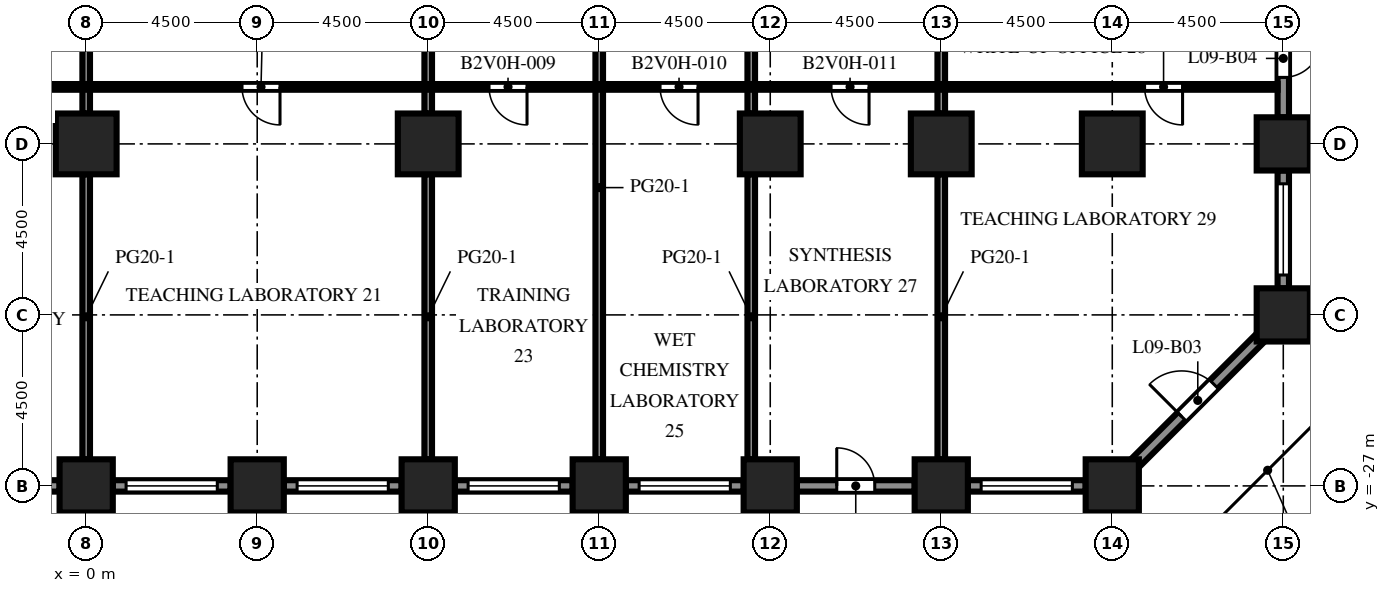
"""IFC4 building model, lengths in metres.
Left out: names, types, materials, properties, quantities, classifications, styles, units other than length and angle.
Written with IfcOpenShell. Run it as: python <this file> out.ifc"""

import sys

from ifc_helpers import new_model, si_unit, direction, frame, frame_2d, origin, origin_2d, place, context, subcontext, project, spatial, rectangle, extrude, element, fill, save


model = new_model("IFC4")
c1 = context("Model", 3, precision=1e-05, world=origin(), true_north=direction((0.0, 1.0)))
c2 = subcontext(c1, "Body", "Model", "MODEL_VIEW")
j1 = project(units=[si_unit("LENGTHUNIT", "METRE"), si_unit("PLANEANGLEUNIT", "RADIAN")], contexts=[c1])
p1 = place(None, origin())
s1 = spatial("IfcSite", under=j1, at=p1, CompositionType="ELEMENT")
p2 = place(p1, origin())
s2 = spatial("IfcBuilding", under=s1, at=p2, CompositionType="ELEMENT")
p3 = place(p2, frame((0.0, 0.0, 41.9)))
s3 = spatial("IfcBuildingStorey", under=s2, at=p3, CompositionType="ELEMENT", Elevation=41.9)
for number, where, z_axis, x_axis in (
    (1, (0.0, -27.0, 0.0), (0.0, 0.0, 1.0), (1.0, 0.0, 0.0)),
    (2, (4.5, -27.0, 0.0), (0.0, 0.0, 1.0), (1.0, 0.0, 0.0)),
    (3, (9.0, -27.0, 0.0), (0.0, 0.0, 1.0), (1.0, 0.0, 0.0)),
    (4, (13.5, -27.0, 0.0), (0.0, 0.0, 1.0), (1.0, 0.0, 0.0)),
    (5, (18.0, -27.0, 0.0), (0.0, 0.0, 1.0), (1.0, 0.0, 0.0)),
    (6, (22.5, -27.0, 0.0), (0.0, 0.0, 1.0), (1.0, 0.0, 0.0)),
    (7, (27.0, -27.0, 0.0), (0.0, 0.0, 1.0), (1.0, 0.0, 0.0)),
):
    element("IfcColumn", number, at=place(p3, frame(where, z_axis=z_axis, x_axis=x_axis)), inside=s3, PredefinedType="COLUMN", context=c2, shape_type="SweptSolid", body=[
        extrude(rectangle(XDim=1.4, YDim=1.4, at=origin_2d()), origin(), (0.0, 0.0, 1.0), 4.1),
    ])
for number, where, z_axis, x_axis in (
    (8, (31.5, -22.5, -0.45), (0.0, 0.0, 1.0), (1.0, 0.0, 0.0)),
    (9, (31.5, -18.0, -0.45), (0.0, 0.0, 1.0), (1.0, 0.0, 0.0)),
):
    element("IfcColumn", number, at=place(p3, frame(where, z_axis=z_axis, x_axis=x_axis)), inside=s3, PredefinedType="COLUMN", context=c2, shape_type="SweptSolid", body=[
        extrude(rectangle(XDim=1.4, YDim=1.4, at=origin_2d()), origin(), (0.0, 0.0, 1.0), 4.55),
    ])
for number, where, z_axis, x_axis in (
    (10, (0.0, -18.0, 0.0), (0.0, 0.0, 1.0), (1.0, 0.0, 0.0)),
    (11, (9.0, -18.0, 0.0), (0.0, 0.0, 1.0), (1.0, 0.0, 0.0)),
):
    element("IfcColumn", number, at=place(p3, frame(where, z_axis=z_axis, x_axis=x_axis)), inside=s3, PredefinedType="COLUMN", context=c2, shape_type="SweptSolid", body=[
        extrude(rectangle(XDim=1.6, YDim=1.6, at=origin_2d()), origin(), (0.0, 0.0, 1.0), 4.1),
    ])
for number, where, z_axis, x_axis in (
    (12, (18.0, -18.0, -0.45), (0.0, 0.0, 1.0), (1.0, 0.0, 0.0)),
    (13, (22.5, -18.0, -0.45), (0.0, 0.0, 1.0), (1.0, 0.0, 0.0)),
    (14, (27.0, -18.0, -0.45), (0.0, 0.0, 1.0), (1.0, 0.0, 0.0)),
):
    element("IfcColumn", number, at=place(p3, frame(where, z_axis=z_axis, x_axis=x_axis)), inside=s3, PredefinedType="COLUMN", context=c2, shape_type="SweptSolid", body=[
        extrude(rectangle(XDim=1.6, YDim=1.6, at=origin_2d()), origin(), (0.0, 0.0, 1.0), 4.55),
    ])
p4 = place(p3, frame((-0.7, -27.0, 0.0), z_axis=(0.0, 0.0, 1.0), x_axis=(-1.0, 0.0, 0.0)))
e15 = element("IfcWall", 15, at=p4, inside=s3, PredefinedType="SOLIDWALL", context=c2, shape_type="SweptSolid", body=[
    extrude(rectangle(XDim=3.1, YDim=0.3, at=frame_2d((1.55, 0.0))), origin(), (0.0, 0.0, 1.0), 2.75),
])
p5 = place(p4, frame((0.35, 0.0, 0.8)))
e16 = element("IfcOpeningElement", 16, at=p5, cuts=e15, PredefinedType="OPENING", context=c2, shape_type="SweptSolid", body=[
    extrude(rectangle(XDim=2.4, YDim=1.7, at=frame_2d((1.2, 0.85))), frame((0.0, 0.16, 0.0), z_axis=(0.0, -1.0, 0.0), x_axis=(1.0, 0.0, 0.0)), (0.0, 0.0, 1.0), 0.32),
])
p6 = place(p3, frame((3.8, -27.0, 0.0), z_axis=(0.0, 0.0, 1.0), x_axis=(-1.0, 0.0, 0.0)))
e17 = element("IfcWall", 17, at=p6, inside=s3, PredefinedType="SOLIDWALL", context=c2, shape_type="SweptSolid", body=[
    extrude(rectangle(XDim=3.1, YDim=0.3, at=frame_2d((1.55, 0.0))), origin(), (0.0, 0.0, 1.0), 2.75),
])
p7 = place(p6, frame((0.35, 0.0, 0.8)))
e18 = element("IfcOpeningElement", 18, at=p7, cuts=e17, PredefinedType="OPENING", context=c2, shape_type="SweptSolid", body=[
    extrude(rectangle(XDim=2.4, YDim=1.7, at=frame_2d((1.2, 0.85))), frame((0.0, 0.16, 0.0), z_axis=(0.0, -1.0, 0.0), x_axis=(1.0, 0.0, 0.0)), (0.0, 0.0, 1.0), 0.32),
])
p8 = place(p3, frame((8.3, -27.0, 0.0), z_axis=(0.0, 0.0, 1.0), x_axis=(-1.0, 0.0, 0.0)))
e19 = element("IfcWall", 19, at=p8, inside=s3, PredefinedType="SOLIDWALL", context=c2, shape_type="SweptSolid", body=[
    extrude(rectangle(XDim=3.1, YDim=0.3, at=frame_2d((1.55, 0.0))), origin(), (0.0, 0.0, 1.0), 2.75),
])
p9 = place(p8, frame((0.35, 0.0, 0.8)))
e20 = element("IfcOpeningElement", 20, at=p9, cuts=e19, PredefinedType="OPENING", context=c2, shape_type="SweptSolid", body=[
    extrude(rectangle(XDim=2.4, YDim=1.7, at=frame_2d((1.2, 0.85))), frame((0.0, 0.16, 0.0), z_axis=(0.0, -1.0, 0.0), x_axis=(1.0, 0.0, 0.0)), (0.0, 0.0, 1.0), 0.32),
])
p10 = place(p3, frame((12.8, -27.0, 0.0), z_axis=(0.0, 0.0, 1.0), x_axis=(-1.0, 0.0, 0.0)))
e21 = element("IfcWall", 21, at=p10, inside=s3, PredefinedType="SOLIDWALL", context=c2, shape_type="SweptSolid", body=[
    extrude(rectangle(XDim=3.1, YDim=0.3, at=frame_2d((1.55, 0.0))), origin(), (0.0, 0.0, 1.0), 2.75),
])
p11 = place(p10, frame((0.35, 0.0, 0.8)))
e22 = element("IfcOpeningElement", 22, at=p11, cuts=e21, PredefinedType="OPENING", context=c2, shape_type="SweptSolid", body=[
    extrude(rectangle(XDim=2.4, YDim=1.7, at=frame_2d((1.2, 0.85))), frame((0.0, 0.16, 0.0), z_axis=(0.0, -1.0, 0.0), x_axis=(1.0, 0.0, 0.0)), (0.0, 0.0, 1.0), 0.32),
])
p12 = place(p3, frame((17.3, -27.0, 0.0), z_axis=(0.0, 0.0, 1.0), x_axis=(-1.0, 0.0, 0.0)))
e23 = element("IfcWall", 23, at=p12, inside=s3, PredefinedType="SOLIDWALL", context=c2, shape_type="SweptSolid", body=[
    extrude(rectangle(XDim=3.1, YDim=0.3, at=frame_2d((1.55, 0.0))), origin(), (0.0, 0.0, 1.0), 2.75),
])
p13 = place(p12, frame((0.35, 0.0, 0.8)))
e24 = element("IfcOpeningElement", 24, at=p13, cuts=e23, PredefinedType="OPENING", context=c2, shape_type="SweptSolid", body=[
    extrude(rectangle(XDim=2.4, YDim=1.7, at=frame_2d((1.2, 0.85))), frame((0.0, 0.16, 0.0), z_axis=(0.0, -1.0, 0.0), x_axis=(1.0, 0.0, 0.0)), (0.0, 0.0, 1.0), 0.32),
])
p14 = place(p3, frame((21.8, -27.0, 0.0), z_axis=(0.0, 0.0, 1.0), x_axis=(-1.0, 0.0, 0.0)))
e25 = element("IfcWall", 25, at=p14, inside=s3, PredefinedType="SOLIDWALL", context=c2, shape_type="SweptSolid", body=[
    extrude(rectangle(XDim=3.1, YDim=0.3, at=frame_2d((1.55, 0.0))), origin(), (0.0, 0.0, 1.0), 2.75),
])
p15 = place(p14, frame((1.05, 0.0, 0.0)))
e26 = element("IfcOpeningElement", 26, at=p15, cuts=e25, PredefinedType="OPENING", context=c2, shape_type="SweptSolid", body=[
    extrude(rectangle(XDim=1.0, YDim=2.2, at=frame_2d((0.5, 1.1))), frame((0.0, 0.16, 0.0), z_axis=(0.0, -1.0, 0.0), x_axis=(1.0, 0.0, 0.0)), (0.0, 0.0, 1.0), 0.32),
])
p16 = place(p3, frame((26.3, -27.0, 0.0), z_axis=(0.0, 0.0, 1.0), x_axis=(-1.0, 0.0, 0.0)))
e27 = element("IfcWall", 27, at=p16, inside=s3, PredefinedType="SOLIDWALL", context=c2, shape_type="SweptSolid", body=[
    extrude(rectangle(XDim=3.1, YDim=0.3, at=frame_2d((1.55, 0.0))), origin(), (0.0, 0.0, 1.0), 2.75),
])
p17 = place(p16, frame((0.35, 0.0, 0.8)))
e28 = element("IfcOpeningElement", 28, at=p17, cuts=e27, PredefinedType="OPENING", context=c2, shape_type="SweptSolid", body=[
    extrude(rectangle(XDim=2.4, YDim=1.7, at=frame_2d((1.2, 0.85))), frame((0.0, 0.16, 0.0), z_axis=(0.0, -1.0, 0.0), x_axis=(1.0, 0.0, 0.0)), (0.0, 0.0, 1.0), 0.32),
])
p18 = place(p3, frame((30.906, -23.094, 0.0), z_axis=(0.0, 0.0, 1.0), x_axis=(-0.707106781187, -0.707106781187, 0.0)))
e29 = element("IfcWall", 29, at=p18, inside=s3, PredefinedType="SOLIDWALL", context=c2, shape_type="SweptSolid", body=[
    extrude(rectangle(XDim=4.684, YDim=0.3, at=frame_2d((2.342, 0.0))), origin(), (0.0, 0.0, 1.0), 2.75),
])
p19 = place(p18, frame((1.742, 0.0, 0.0)))
e30 = element("IfcOpeningElement", 30, at=p19, cuts=e29, PredefinedType="OPENING", context=c2, shape_type="SweptSolid", body=[
    extrude(rectangle(XDim=1.2, YDim=2.2, at=frame_2d((0.6, 1.1))), frame((0.0, 0.16, 0.0), z_axis=(0.0, -1.0, 0.0), x_axis=(1.0, 0.0, 0.0)), (0.0, 0.0, 1.0), 0.32),
])
p20 = place(p3, frame((31.5, -18.7, 0.0), z_axis=(0.0, 0.0, 1.0), x_axis=(0.0, -1.0, 0.0)))
e31 = element("IfcWall", 31, at=p20, inside=s3, PredefinedType="SOLIDWALL", context=c2, shape_type="SweptSolid", body=[
    extrude(rectangle(XDim=3.1, YDim=0.3, at=frame_2d((1.55, 0.0))), origin(), (0.0, 0.0, 1.0), 2.75),
])
p21 = place(p20, frame((0.35, 0.0, 0.8)))
e32 = element("IfcOpeningElement", 32, at=p21, cuts=e31, PredefinedType="OPENING", context=c2, shape_type="SweptSolid", body=[
    extrude(rectangle(XDim=2.4, YDim=1.7, at=frame_2d((1.2, 0.85))), frame((0.0, 0.16, 0.0), z_axis=(0.0, -1.0, 0.0), x_axis=(1.0, 0.0, 0.0)), (0.0, 0.0, 1.0), 0.32),
])
p22 = place(p3, frame((31.5, -14.2, 0.0), z_axis=(0.0, 0.0, 1.0), x_axis=(0.0, -1.0, 0.0)))
e33 = element("IfcWall", 33, at=p22, inside=s3, PredefinedType="SOLIDWALL", context=c2, shape_type="SweptSolid", body=[
    extrude(rectangle(XDim=3.1, YDim=0.3, at=frame_2d((1.55, 0.0))), origin(), (0.0, 0.0, 1.0), 2.75),
])
p23 = place(p22, frame((1.05, 0.0, 0.0)))
e34 = element("IfcOpeningElement", 34, at=p23, cuts=e33, PredefinedType="OPENING", context=c2, shape_type="SweptSolid", body=[
    extrude(rectangle(XDim=1.0, YDim=2.2, at=frame_2d((0.5, 1.1))), frame((0.0, 0.16, 0.0), z_axis=(0.0, -1.0, 0.0), x_axis=(1.0, 0.0, 0.0)), (0.0, 0.0, 1.0), 0.32),
])
p24 = place(p3, frame((0.0, -26.3, 0.0), z_axis=(0.0, 0.0, 1.0), x_axis=(0.0, 1.0, 0.0)))
e35 = element("IfcWall", 35, at=p24, inside=s3, PredefinedType="PARTITIONING", context=c2, shape_type="SweptSolid", body=[
    extrude(rectangle(XDim=7.5, YDim=0.2, at=frame_2d((3.75, 0.0))), origin(), (0.0, 0.0, 1.0), 3.65),
])
p25 = place(p3, frame((0.0, -17.2, 0.0), z_axis=(0.0, 0.0, 1.0), x_axis=(0.0, 1.0, 0.0)))
e36 = element("IfcWall", 36, at=p25, inside=s3, PredefinedType="PARTITIONING", context=c2, shape_type="SweptSolid", body=[
    extrude(rectangle(XDim=5.2, YDim=0.2, at=frame_2d((2.6, 0.0))), origin(), (0.0, 0.0, 1.0), 3.65),
])
p26 = place(p3, frame((9.0, -26.3, 0.0), z_axis=(0.0, 0.0, 1.0), x_axis=(0.0, 1.0, 0.0)))
e37 = element("IfcWall", 37, at=p26, inside=s3, PredefinedType="PARTITIONING", context=c2, shape_type="SweptSolid", body=[
    extrude(rectangle(XDim=7.5, YDim=0.2, at=frame_2d((3.75, 0.0))), origin(), (0.0, 0.0, 1.0), 3.65),
])
p27 = place(p3, frame((9.0, -17.2, 0.0), z_axis=(0.0, 0.0, 1.0), x_axis=(0.0, 1.0, 0.0)))
e38 = element("IfcWall", 38, at=p27, inside=s3, PredefinedType="PARTITIONING", context=c2, shape_type="SweptSolid", body=[
    extrude(rectangle(XDim=5.2, YDim=0.2, at=frame_2d((2.6, 0.0))), origin(), (0.0, 0.0, 1.0), 3.65),
])
p28 = place(p3, frame((13.5, -26.3, 0.0), z_axis=(0.0, 0.0, 1.0), x_axis=(0.0, 1.0, 0.0)))
e39 = element("IfcWall", 39, at=p28, inside=s3, PredefinedType="PARTITIONING", context=c2, shape_type="SweptSolid", body=[
    extrude(rectangle(XDim=14.3, YDim=0.2, at=frame_2d((7.15, 0.0))), origin(), (0.0, 0.0, 1.0), 3.65),
])
p29 = place(p3, frame((17.5, -26.3, 0.0), z_axis=(0.0, 0.0, 1.0), x_axis=(0.0, 1.0, 0.0)))
e40 = element("IfcWall", 40, at=p29, inside=s3, PredefinedType="PARTITIONING", context=c2, shape_type="SweptSolid", body=[
    extrude(rectangle(XDim=7.5, YDim=0.2, at=frame_2d((3.75, 0.0))), origin(), (0.0, 0.0, 1.0), 3.65),
])
p30 = place(p3, frame((17.5, -17.2, 0.0), z_axis=(0.0, 0.0, 1.0), x_axis=(0.0, 1.0, 0.0)))
e41 = element("IfcWall", 41, at=p30, inside=s3, PredefinedType="PARTITIONING", context=c2, shape_type="SweptSolid", body=[
    extrude(rectangle(XDim=5.2, YDim=0.2, at=frame_2d((2.6, 0.0))), origin(), (0.0, 0.0, 1.0), 3.65),
])
p31 = place(p3, frame((22.5, -26.3, 0.0), z_axis=(0.0, 0.0, 1.0), x_axis=(0.0, 1.0, 0.0)))
e42 = element("IfcWall", 42, at=p31, inside=s3, PredefinedType="PARTITIONING", context=c2, shape_type="SweptSolid", body=[
    extrude(rectangle(XDim=7.5, YDim=0.2, at=frame_2d((3.75, 0.0))), origin(), (0.0, 0.0, 1.0), 3.65),
])
p32 = place(p3, frame((22.5, -17.2, 0.0), z_axis=(0.0, 0.0, 1.0), x_axis=(0.0, 1.0, 0.0)))
e43 = element("IfcWall", 43, at=p32, inside=s3, PredefinedType="PARTITIONING", context=c2, shape_type="SweptSolid", body=[
    extrude(rectangle(XDim=5.2, YDim=0.2, at=frame_2d((2.6, 0.0))), origin(), (0.0, 0.0, 1.0), 3.65),
])
p33 = place(p3, frame((31.35, -16.5, 0.0), z_axis=(0.0, 0.0, 1.0), x_axis=(-1.0, 0.0, 0.0)))
e44 = element("IfcWall", 44, at=p33, inside=s3, PredefinedType="PARTITIONING", context=c2, shape_type="SweptSolid", body=[
    extrude(rectangle(XDim=53.7, YDim=0.15, at=frame_2d((26.85, 0.0))), origin(), (0.0, 0.0, 1.0), 3.65),
])
p34 = place(p33, frame((50.75, 0.0, 0.0)))
e45 = element("IfcOpeningElement", 45, at=p34, cuts=e44, PredefinedType="OPENING", context=c2, shape_type="SweptSolid", body=[
    extrude(rectangle(XDim=1.0, YDim=2.1, at=frame_2d((0.5, 1.05))), frame((0.0, 0.085, 0.0), z_axis=(0.0, -1.0, 0.0), x_axis=(1.0, 0.0, 0.0)), (0.0, 0.0, 1.0), 0.17),
])
p35 = place(p33, frame((43.75, 0.0, 0.0)))
e46 = element("IfcOpeningElement", 46, at=p35, cuts=e44, PredefinedType="OPENING", context=c2, shape_type="SweptSolid", body=[
    extrude(rectangle(XDim=1.0, YDim=2.1, at=frame_2d((0.5, 1.05))), frame((0.0, 0.085, 0.0), z_axis=(0.0, -1.0, 0.0), x_axis=(1.0, 0.0, 0.0)), (0.0, 0.0, 1.0), 0.17),
])
p36 = place(p33, frame((33.0, 0.0, 0.0)))
e47 = element("IfcOpeningElement", 47, at=p36, cuts=e44, PredefinedType="OPENING", context=c2, shape_type="SweptSolid", body=[
    extrude(rectangle(XDim=1.0, YDim=2.1, at=frame_2d((0.5, 1.05))), frame((0.0, 0.085, 0.0), z_axis=(0.0, -1.0, 0.0), x_axis=(1.0, 0.0, 0.0)), (0.0, 0.0, 1.0), 0.17),
])
p37 = place(p33, frame((26.25, 0.0, 0.0)))
e48 = element("IfcOpeningElement", 48, at=p37, cuts=e44, PredefinedType="OPENING", context=c2, shape_type="SweptSolid", body=[
    extrude(rectangle(XDim=1.0, YDim=2.1, at=frame_2d((0.5, 1.05))), frame((0.0, 0.085, 0.0), z_axis=(0.0, -1.0, 0.0), x_axis=(1.0, 0.0, 0.0)), (0.0, 0.0, 1.0), 0.17),
])
p38 = place(p33, frame((19.75, 0.0, 0.0)))
e49 = element("IfcOpeningElement", 49, at=p38, cuts=e44, PredefinedType="OPENING", context=c2, shape_type="SweptSolid", body=[
    extrude(rectangle(XDim=1.0, YDim=2.1, at=frame_2d((0.5, 1.05))), frame((0.0, 0.085, 0.0), z_axis=(0.0, -1.0, 0.0), x_axis=(1.0, 0.0, 0.0)), (0.0, 0.0, 1.0), 0.17),
])
p39 = place(p33, frame((15.25, 0.0, 0.0)))
e50 = element("IfcOpeningElement", 50, at=p39, cuts=e44, PredefinedType="OPENING", context=c2, shape_type="SweptSolid", body=[
    extrude(rectangle(XDim=1.0, YDim=2.1, at=frame_2d((0.5, 1.05))), frame((0.0, 0.085, 0.0), z_axis=(0.0, -1.0, 0.0), x_axis=(1.0, 0.0, 0.0)), (0.0, 0.0, 1.0), 0.17),
])
p40 = place(p33, frame((10.75, 0.0, 0.0)))
e51 = element("IfcOpeningElement", 51, at=p40, cuts=e44, PredefinedType="OPENING", context=c2, shape_type="SweptSolid", body=[
    extrude(rectangle(XDim=1.0, YDim=2.1, at=frame_2d((0.5, 1.05))), frame((0.0, 0.085, 0.0), z_axis=(0.0, -1.0, 0.0), x_axis=(1.0, 0.0, 0.0)), (0.0, 0.0, 1.0), 0.17),
])
p41 = place(p33, frame((2.5, 0.0, 0.0)))
e52 = element("IfcOpeningElement", 52, at=p41, cuts=e44, PredefinedType="OPENING", context=c2, shape_type="SweptSolid", body=[
    extrude(rectangle(XDim=1.0, YDim=2.1, at=frame_2d((0.5, 1.05))), frame((0.0, 0.085, 0.0), z_axis=(0.0, -1.0, 0.0), x_axis=(1.0, 0.0, 0.0)), (0.0, 0.0, 1.0), 0.17),
])
p42 = place(p7, origin())
e53 = element("IfcWindow", 53, at=p42, inside=s3, PartitioningType="SINGLE_PANEL", PredefinedType="WINDOW", context=c2, shape_type="SweptSolid", body=[
    extrude(rectangle(XDim=2.4, YDim=1.7, at=frame_2d((1.2, 0.85))), frame((0.0, 0.03, 0.0), z_axis=(0.0, -1.0, 0.0), x_axis=(1.0, 0.0, 0.0)), (0.0, 0.0, 1.0), 0.06),
])
fill(e18, e53)
p43 = place(p9, origin())
e54 = element("IfcWindow", 54, at=p43, inside=s3, PartitioningType="SINGLE_PANEL", PredefinedType="WINDOW", context=c2, shape_type="SweptSolid", body=[
    extrude(rectangle(XDim=2.4, YDim=1.7, at=frame_2d((1.2, 0.85))), frame((0.0, 0.03, 0.0), z_axis=(0.0, -1.0, 0.0), x_axis=(1.0, 0.0, 0.0)), (0.0, 0.0, 1.0), 0.06),
])
fill(e20, e54)
p44 = place(p11, origin())
e55 = element("IfcWindow", 55, at=p44, inside=s3, PartitioningType="SINGLE_PANEL", PredefinedType="WINDOW", context=c2, shape_type="SweptSolid", body=[
    extrude(rectangle(XDim=2.4, YDim=1.7, at=frame_2d((1.2, 0.85))), frame((0.0, 0.03, 0.0), z_axis=(0.0, -1.0, 0.0), x_axis=(1.0, 0.0, 0.0)), (0.0, 0.0, 1.0), 0.06),
])
fill(e22, e55)
p45 = place(p13, origin())
e56 = element("IfcWindow", 56, at=p45, inside=s3, PartitioningType="SINGLE_PANEL", PredefinedType="WINDOW", context=c2, shape_type="SweptSolid", body=[
    extrude(rectangle(XDim=2.4, YDim=1.7, at=frame_2d((1.2, 0.85))), frame((0.0, 0.03, 0.0), z_axis=(0.0, -1.0, 0.0), x_axis=(1.0, 0.0, 0.0)), (0.0, 0.0, 1.0), 0.06),
])
fill(e24, e56)
p46 = place(p15, origin())
e57 = element("IfcDoor", 57, at=p46, inside=s3, OperationType="SINGLE_SWING_RIGHT", PredefinedType="DOOR", context=c2, shape_type="SweptSolid", body=[
    extrude(rectangle(XDim=1.0, YDim=2.2, at=frame_2d((0.5, 1.1))), frame((0.0, 0.025, 0.0), z_axis=(0.0, -1.0, 0.0), x_axis=(1.0, 0.0, 0.0)), (0.0, 0.0, 1.0), 0.05),
])
fill(e26, e57)
p47 = place(p17, origin())
e58 = element("IfcWindow", 58, at=p47, inside=s3, PartitioningType="SINGLE_PANEL", PredefinedType="WINDOW", context=c2, shape_type="SweptSolid", body=[
    extrude(rectangle(XDim=2.4, YDim=1.7, at=frame_2d((1.2, 0.85))), frame((0.0, 0.03, 0.0), z_axis=(0.0, -1.0, 0.0), x_axis=(1.0, 0.0, 0.0)), (0.0, 0.0, 1.0), 0.06),
])
fill(e28, e58)
p48 = place(p19, origin())
e59 = element("IfcDoor", 59, at=p48, inside=s3, OperationType="SINGLE_SWING_RIGHT", PredefinedType="DOOR", context=c2, shape_type="SweptSolid", body=[
    extrude(rectangle(XDim=1.2, YDim=2.2, at=frame_2d((0.6, 1.1))), frame((0.0, 0.025, 0.0), z_axis=(0.0, -1.0, 0.0), x_axis=(1.0, 0.0, 0.0)), (0.0, 0.0, 1.0), 0.05),
])
fill(e30, e59)
p49 = place(p21, origin())
e60 = element("IfcWindow", 60, at=p49, inside=s3, PartitioningType="SINGLE_PANEL", PredefinedType="WINDOW", context=c2, shape_type="SweptSolid", body=[
    extrude(rectangle(XDim=2.4, YDim=1.7, at=frame_2d((1.2, 0.85))), frame((0.0, 0.03, 0.0), z_axis=(0.0, -1.0, 0.0), x_axis=(1.0, 0.0, 0.0)), (0.0, 0.0, 1.0), 0.06),
])
fill(e32, e60)
p50 = place(p23, origin())
e61 = element("IfcDoor", 61, at=p50, inside=s3, OperationType="SINGLE_SWING_LEFT", PredefinedType="DOOR", context=c2, shape_type="SweptSolid", body=[
    extrude(rectangle(XDim=1.0, YDim=2.2, at=frame_2d((0.5, 1.1))), frame((0.0, 0.025, 0.0), z_axis=(0.0, -1.0, 0.0), x_axis=(1.0, 0.0, 0.0)), (0.0, 0.0, 1.0), 0.05),
])
fill(e34, e61)
p51 = place(p37, origin())
e62 = element("IfcDoor", 62, at=p51, inside=s3, OperationType="SINGLE_SWING_LEFT", PredefinedType="DOOR", context=c2, shape_type="SweptSolid", body=[
    extrude(rectangle(XDim=1.0, YDim=2.1, at=frame_2d((0.5, 1.05))), frame((0.0, 0.025, 0.0), z_axis=(0.0, -1.0, 0.0), x_axis=(1.0, 0.0, 0.0)), (0.0, 0.0, 1.0), 0.05),
])
fill(e48, e62)
p52 = place(p38, origin())
e63 = element("IfcDoor", 63, at=p52, inside=s3, OperationType="SINGLE_SWING_LEFT", PredefinedType="DOOR", context=c2, shape_type="SweptSolid", body=[
    extrude(rectangle(XDim=1.0, YDim=2.1, at=frame_2d((0.5, 1.05))), frame((0.0, 0.025, 0.0), z_axis=(0.0, -1.0, 0.0), x_axis=(1.0, 0.0, 0.0)), (0.0, 0.0, 1.0), 0.05),
])
fill(e49, e63)
p53 = place(p39, origin())
e64 = element("IfcDoor", 64, at=p53, inside=s3, OperationType="SINGLE_SWING_LEFT", PredefinedType="DOOR", context=c2, shape_type="SweptSolid", body=[
    extrude(rectangle(XDim=1.0, YDim=2.1, at=frame_2d((0.5, 1.05))), frame((0.0, 0.025, 0.0), z_axis=(0.0, -1.0, 0.0), x_axis=(1.0, 0.0, 0.0)), (0.0, 0.0, 1.0), 0.05),
])
fill(e50, e64)
p54 = place(p40, origin())
e65 = element("IfcDoor", 65, at=p54, inside=s3, OperationType="SINGLE_SWING_LEFT", PredefinedType="DOOR", context=c2, shape_type="SweptSolid", body=[
    extrude(rectangle(XDim=1.0, YDim=2.1, at=frame_2d((0.5, 1.05))), frame((0.0, 0.025, 0.0), z_axis=(0.0, -1.0, 0.0), x_axis=(1.0, 0.0, 0.0)), (0.0, 0.0, 1.0), 0.05),
])
fill(e51, e65)
p55 = place(p41, origin())
e66 = element("IfcDoor", 66, at=p55, inside=s3, OperationType="SINGLE_SWING_LEFT", PredefinedType="DOOR", context=c2, shape_type="SweptSolid", body=[
    extrude(rectangle(XDim=1.0, YDim=2.1, at=frame_2d((0.5, 1.05))), frame((0.0, 0.025, 0.0), z_axis=(0.0, -1.0, 0.0), x_axis=(1.0, 0.0, 0.0)), (0.0, 0.0, 1.0), 0.05),
])
fill(e52, e66)
save(model, sys.argv[1])
